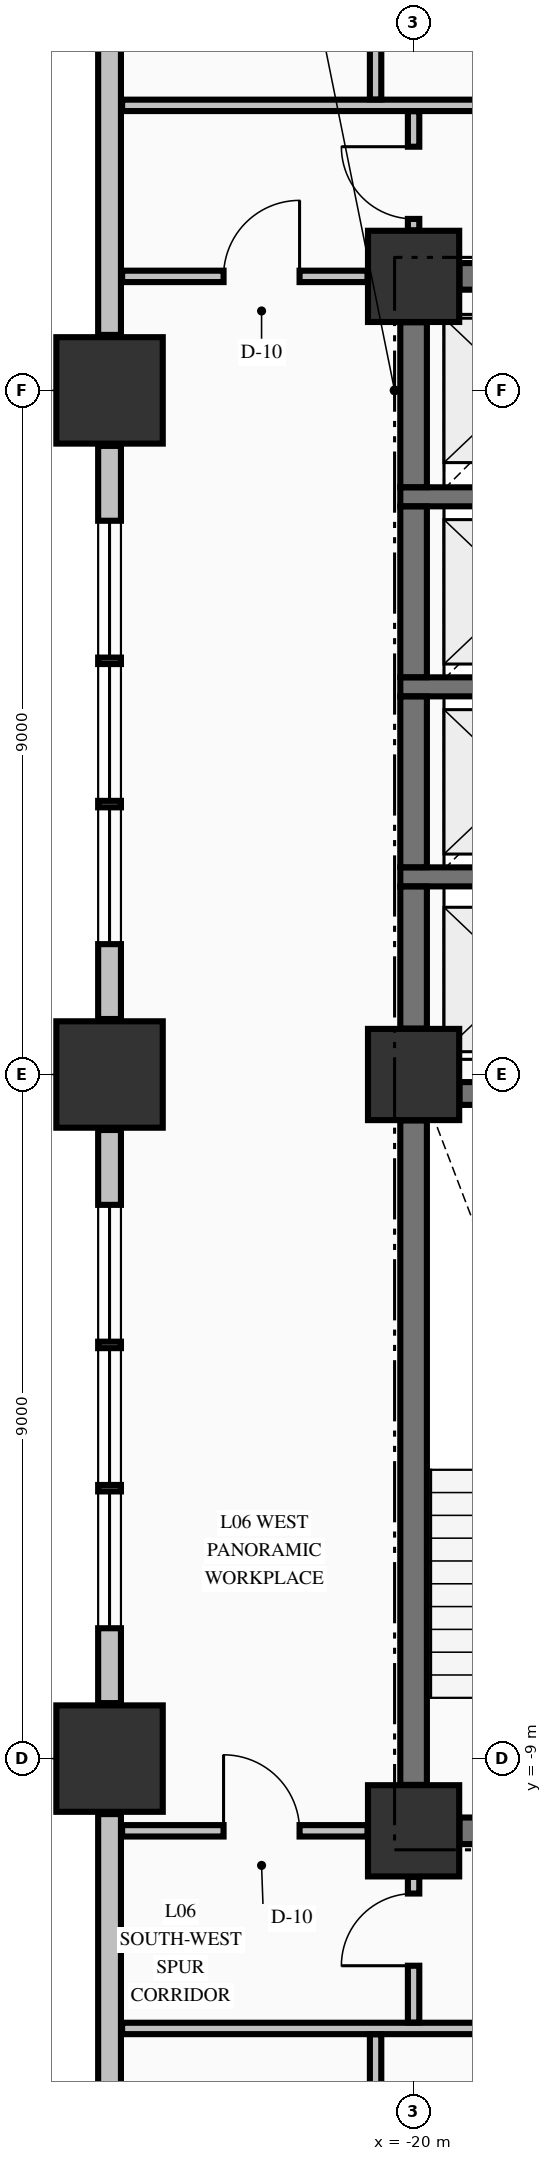
"""IFC4 building model, lengths in metres.
Left out: names, types, materials, properties, quantities, classifications, styles, units other than length and angle.
Written with IfcOpenShell. Run it as: python <this file> out.ifc"""

import sys

from ifc_helpers import new_model, si_unit, direction, frame, frame_2d, origin, origin_2d, place, context, subcontext, project, spatial, rectangle, extrude, element, fill, save


model = new_model("IFC4")
c1 = context("Model", 3, precision=1e-05, world=origin(), true_north=direction((0.0, 1.0)))
c2 = subcontext(c1, "Body", "Model", "MODEL_VIEW")
j1 = project(units=[si_unit("LENGTHUNIT", "METRE"), si_unit("PLANEANGLEUNIT", "RADIAN")], contexts=[c1])
p1 = place(None, origin())
s1 = spatial("IfcSite", under=j1, at=p1, CompositionType="ELEMENT")
p2 = place(p1, origin())
s2 = spatial("IfcBuilding", under=s1, at=p2, CompositionType="ELEMENT")
p3 = place(p2, frame((0.0, 0.0, 30.77)))
s3 = spatial("IfcBuildingStorey", under=s2, at=p3, CompositionType="ELEMENT", Elevation=30.77)
for number, where, z_axis, x_axis in (
    (1, (-24.0, -9.0, -0.25), (0.0, 0.0, 1.0), (1.0, 0.0, 0.0)),
    (2, (-24.0, 0.0, -0.25), (0.0, 0.0, 1.0), (1.0, 0.0, 0.0)),
    (3, (-24.0, 9.0, -0.25), (0.0, 0.0, 1.0), (1.0, 0.0, 0.0)),
):
    element("IfcColumn", number, at=place(p3, frame(where, z_axis=z_axis, x_axis=x_axis)), inside=s3, PredefinedType="COLUMN", context=c2, shape_type="SweptSolid", body=[
        extrude(rectangle(XDim=1.4, YDim=1.4, at=origin_2d()), origin(), (0.0, 0.0, 1.0), 3.52),
    ])
for number, where, z_axis, x_axis in (
    (4, (-20.0, -9.95, -0.25), (0.0, 0.0, 1.0), (1.0, 0.0, 0.0)),
    (5, (-20.0, 10.5, -0.25), (0.0, 0.0, 1.0), (1.0, 0.0, 0.0)),
    (6, (-20.0, 0.0, -0.25), (0.0, 0.0, 1.0), (1.0, 0.0, 0.0)),
):
    element("IfcColumn", number, at=place(p3, frame(where, z_axis=z_axis, x_axis=x_axis)), inside=s3, PredefinedType="COLUMN", context=c2, shape_type="SweptSolid", body=[
        extrude(rectangle(XDim=1.2, YDim=1.2, at=origin_2d()), origin(), (0.0, 0.0, 1.0), 3.52),
    ])
p4 = place(p3, frame((-24.0, -9.73, 0.0), z_axis=(0.0, 0.0, 1.0), x_axis=(0.0, -1.0, 0.0)))
e7 = element("IfcWall", 7, at=p4, inside=s3, PredefinedType="STANDARD", context=c2, shape_type="SweptSolid", body=[
    extrude(rectangle(XDim=12.54, YDim=0.3, at=frame_2d((6.27, 0.0))), origin(), (0.0, 0.0, 1.0), 2.662),
])
p5 = place(p3, frame((-24.0, -0.73, 0.0), z_axis=(0.0, 0.0, 1.0), x_axis=(0.0, -1.0, 0.0)))
e8 = element("IfcWall", 8, at=p5, inside=s3, PredefinedType="STANDARD", context=c2, shape_type="SweptSolid", body=[
    extrude(rectangle(XDim=7.54, YDim=0.3, at=frame_2d((3.77, 0.0))), origin(), (0.0, 0.0, 1.0), 2.662),
])
p6 = place(p5, frame((0.985, 0.0, 0.78)))
e9 = element("IfcOpeningElement", 9, at=p6, cuts=e8, PredefinedType="OPENING", context=c2, shape_type="SweptSolid", body=[
    extrude(rectangle(XDim=1.8, YDim=1.72, at=frame_2d((0.9, 0.86))), frame((0.0, 0.16, 0.0), z_axis=(0.0, -1.0, 0.0), x_axis=(1.0, 0.0, 0.0)), (0.0, 0.0, 1.0), 0.32),
])
p7 = place(p5, frame((2.87, 0.0, 0.78)))
e10 = element("IfcOpeningElement", 10, at=p7, cuts=e8, PredefinedType="OPENING", context=c2, shape_type="SweptSolid", body=[
    extrude(rectangle(XDim=1.8, YDim=1.72, at=frame_2d((0.9, 0.86))), frame((0.0, 0.16, 0.0), z_axis=(0.0, -1.0, 0.0), x_axis=(1.0, 0.0, 0.0)), (0.0, 0.0, 1.0), 0.32),
])
p8 = place(p5, frame((4.755, 0.0, 0.78)))
e11 = element("IfcOpeningElement", 11, at=p8, cuts=e8, PredefinedType="OPENING", context=c2, shape_type="SweptSolid", body=[
    extrude(rectangle(XDim=1.8, YDim=1.72, at=frame_2d((0.9, 0.86))), frame((0.0, 0.16, 0.0), z_axis=(0.0, -1.0, 0.0), x_axis=(1.0, 0.0, 0.0)), (0.0, 0.0, 1.0), 0.32),
])
p9 = place(p3, frame((-24.0, 8.27, 0.0), z_axis=(0.0, 0.0, 1.0), x_axis=(0.0, -1.0, 0.0)))
e12 = element("IfcWall", 12, at=p9, inside=s3, PredefinedType="STANDARD", context=c2, shape_type="SweptSolid", body=[
    extrude(rectangle(XDim=7.54, YDim=0.3, at=frame_2d((3.77, 0.0))), origin(), (0.0, 0.0, 1.0), 2.662),
])
p10 = place(p9, frame((0.985, 0.0, 0.78)))
e13 = element("IfcOpeningElement", 13, at=p10, cuts=e12, PredefinedType="OPENING", context=c2, shape_type="SweptSolid", body=[
    extrude(rectangle(XDim=1.8, YDim=1.72, at=frame_2d((0.9, 0.86))), frame((0.0, 0.16, 0.0), z_axis=(0.0, -1.0, 0.0), x_axis=(1.0, 0.0, 0.0)), (0.0, 0.0, 1.0), 0.32),
])
p11 = place(p9, frame((2.87, 0.0, 0.78)))
e14 = element("IfcOpeningElement", 14, at=p11, cuts=e12, PredefinedType="OPENING", context=c2, shape_type="SweptSolid", body=[
    extrude(rectangle(XDim=1.8, YDim=1.72, at=frame_2d((0.9, 0.86))), frame((0.0, 0.16, 0.0), z_axis=(0.0, -1.0, 0.0), x_axis=(1.0, 0.0, 0.0)), (0.0, 0.0, 1.0), 0.32),
])
p12 = place(p9, frame((4.755, 0.0, 0.78)))
e15 = element("IfcOpeningElement", 15, at=p12, cuts=e12, PredefinedType="OPENING", context=c2, shape_type="SweptSolid", body=[
    extrude(rectangle(XDim=1.8, YDim=1.72, at=frame_2d((0.9, 0.86))), frame((0.0, 0.16, 0.0), z_axis=(0.0, -1.0, 0.0), x_axis=(1.0, 0.0, 0.0)), (0.0, 0.0, 1.0), 0.32),
])
p13 = place(p3, frame((-24.0, 22.27, 0.0), z_axis=(0.0, 0.0, 1.0), x_axis=(0.0, -1.0, 0.0)))
e16 = element("IfcWall", 16, at=p13, inside=s3, PredefinedType="STANDARD", context=c2, shape_type="SweptSolid", body=[
    extrude(rectangle(XDim=12.54, YDim=0.3, at=frame_2d((6.27, 0.0))), origin(), (0.0, 0.0, 1.0), 2.662),
])
p14 = place(p3, frame((-19.396, -9.95, 0.0), z_axis=(0.0, 0.0, 1.0), x_axis=(1.0, 0.0, 0.0)))
e17 = element("IfcWall", 17, at=p14, inside=s3, PredefinedType="SHEAR", context=c2, shape_type="SweptSolid", body=[
    extrude(rectangle(XDim=4.696, YDim=0.35, at=frame_2d((2.348, 0.0))), origin(), (0.0, 0.0, 1.0), 3.27),
])
p15 = place(p14, frame((0.571, 0.0, 0.0)))
e18 = element("IfcOpeningElement", 18, at=p15, cuts=e17, PredefinedType="OPENING", context=c2, shape_type="SweptSolid", body=[
    extrude(rectangle(XDim=1.05, YDim=2.15, at=frame_2d((0.525, 1.075))), frame((0.0, 0.185, 0.0), z_axis=(0.0, -1.0, 0.0), x_axis=(1.0, 0.0, 0.0)), (0.0, 0.0, 1.0), 0.37),
])
p16 = place(p3, frame((-19.396, -0.25, 0.0), z_axis=(0.0, 0.0, 1.0), x_axis=(1.0, 0.0, 0.0)))
e19 = element("IfcWall", 19, at=p16, inside=s3, PredefinedType="SHEAR", context=c2, shape_type="SweptSolid", body=[
    extrude(rectangle(XDim=7.792, YDim=0.3, at=frame_2d((3.896, 0.0))), origin(), (0.0, 0.0, 1.0), 3.27),
])
p17 = place(p16, frame((5.696, 0.0, 0.0)))
e20 = element("IfcOpeningElement", 20, at=p17, cuts=e19, PredefinedType="OPENING", context=c2, shape_type="SweptSolid", body=[
    extrude(rectangle(XDim=1.1, YDim=2.15, at=frame_2d((0.55, 1.075))), frame((0.0, 0.16, 0.0), z_axis=(0.0, -1.0, 0.0), x_axis=(1.0, 0.0, 0.0)), (0.0, 0.0, 1.0), 0.32),
])
for number, where, z_axis, x_axis in (
    (21, (-20.175, 2.6, 0.0), (0.0, 0.0, 1.0), (1.0, 0.0, 0.0)),
    (22, (-20.175, 5.1, 0.0), (0.0, 0.0, 1.0), (1.0, 0.0, 0.0)),
    (23, (-20.175, 7.6, 0.0), (0.0, 0.0, 1.0), (1.0, 0.0, 0.0)),
):
    element("IfcWall", number, at=place(p3, frame(where, z_axis=z_axis, x_axis=x_axis)), inside=s3, PredefinedType="SOLIDWALL", context=c2, shape_type="SweptSolid", body=[
        extrude(rectangle(XDim=3.1, YDim=0.25, at=frame_2d((1.55, 0.0))), origin(), (0.0, 0.0, 1.0), 3.27),
    ])
p18 = place(p3, frame((-19.396, 10.5, 0.0), z_axis=(0.0, 0.0, 1.0), x_axis=(1.0, 0.0, 0.0)))
e24 = element("IfcWall", 24, at=p18, inside=s3, PredefinedType="SHEAR", context=c2, shape_type="SweptSolid", body=[
    extrude(rectangle(XDim=4.696, YDim=0.35, at=frame_2d((2.348, 0.0))), origin(), (0.0, 0.0, 1.0), 3.27),
])
p19 = place(p18, frame((2.796, 0.0, 0.0)))
e25 = element("IfcOpeningElement", 25, at=p19, cuts=e24, PredefinedType="OPENING", context=c2, shape_type="SweptSolid", body=[
    extrude(rectangle(XDim=1.2, YDim=2.15, at=frame_2d((0.6, 1.075))), frame((0.0, 0.185, 0.0), z_axis=(0.0, -1.0, 0.0), x_axis=(1.0, 0.0, 0.0)), (0.0, 0.0, 1.0), 0.37),
])
p20 = place(p3, frame((-23.835, -12.55, 0.0), z_axis=(0.0, 0.0, 1.0), x_axis=(1.0, 0.0, 0.0)))
e26 = element("IfcWall", 26, at=p20, inside=s3, PredefinedType="PARTITIONING", context=c2, shape_type="SweptSolid", body=[
    extrude(rectangle(XDim=52.67, YDim=0.15, at=frame_2d((26.335, 0.0))), origin(), (0.0, 0.0, 1.0), 3.27),
])
p21 = place(p20, frame((5.51, 0.0, 0.0)))
e27 = element("IfcOpeningElement", 27, at=p21, cuts=e26, PredefinedType="OPENING", context=c2, shape_type="SweptSolid", body=[
    extrude(rectangle(XDim=0.95, YDim=2.15, at=frame_2d((0.475, 1.075))), frame((0.0, 0.085, 0.0), z_axis=(0.0, -1.0, 0.0), x_axis=(1.0, 0.0, 0.0)), (0.0, 0.0, 1.0), 0.17),
])
p22 = place(p20, frame((12.81, 0.0, 0.0)))
e28 = element("IfcOpeningElement", 28, at=p22, cuts=e26, PredefinedType="OPENING", context=c2, shape_type="SweptSolid", body=[
    extrude(rectangle(XDim=0.95, YDim=2.15, at=frame_2d((0.475, 1.075))), frame((0.0, 0.085, 0.0), z_axis=(0.0, -1.0, 0.0), x_axis=(1.0, 0.0, 0.0)), (0.0, 0.0, 1.0), 0.17),
])
p23 = place(p20, frame((19.01, 0.0, 0.0)))
e29 = element("IfcOpeningElement", 29, at=p23, cuts=e26, PredefinedType="OPENING", context=c2, shape_type="SweptSolid", body=[
    extrude(rectangle(XDim=1.05, YDim=2.15, at=frame_2d((0.525, 1.075))), frame((0.0, 0.085, 0.0), z_axis=(0.0, -1.0, 0.0), x_axis=(1.0, 0.0, 0.0)), (0.0, 0.0, 1.0), 0.17),
])
p24 = place(p20, frame((27.06, 0.0, 0.0)))
e30 = element("IfcOpeningElement", 30, at=p24, cuts=e26, PredefinedType="OPENING", context=c2, shape_type="SweptSolid", body=[
    extrude(rectangle(XDim=0.95, YDim=2.15, at=frame_2d((0.475, 1.075))), frame((0.0, 0.085, 0.0), z_axis=(0.0, -1.0, 0.0), x_axis=(1.0, 0.0, 0.0)), (0.0, 0.0, 1.0), 0.17),
])
p25 = place(p20, frame((34.81, 0.0, 0.0)))
e31 = element("IfcOpeningElement", 31, at=p25, cuts=e26, PredefinedType="OPENING", context=c2, shape_type="SweptSolid", body=[
    extrude(rectangle(XDim=0.95, YDim=2.15, at=frame_2d((0.475, 1.075))), frame((0.0, 0.085, 0.0), z_axis=(0.0, -1.0, 0.0), x_axis=(1.0, 0.0, 0.0)), (0.0, 0.0, 1.0), 0.17),
])
p26 = place(p20, frame((39.76, 0.0, 0.0)))
e32 = element("IfcOpeningElement", 32, at=p26, cuts=e26, PredefinedType="OPENING", context=c2, shape_type="SweptSolid", body=[
    extrude(rectangle(XDim=1.05, YDim=2.15, at=frame_2d((0.525, 1.075))), frame((0.0, 0.085, 0.0), z_axis=(0.0, -1.0, 0.0), x_axis=(1.0, 0.0, 0.0)), (0.0, 0.0, 1.0), 0.17),
])
p27 = place(p3, frame((-23.835, -9.95, 0.0), z_axis=(0.0, 0.0, 1.0), x_axis=(1.0, 0.0, 0.0)))
e33 = element("IfcWall", 33, at=p27, inside=s3, PredefinedType="PARTITIONING", context=c2, shape_type="SweptSolid", body=[
    extrude(rectangle(XDim=3.229, YDim=0.15, at=frame_2d((1.615, 0.0))), origin(), (0.0, 0.0, 1.0), 3.27),
])
p28 = place(p27, frame((1.335, 0.0, 0.0)))
e34 = element("IfcOpeningElement", 34, at=p28, cuts=e33, PredefinedType="OPENING", context=c2, shape_type="SweptSolid", body=[
    extrude(rectangle(XDim=1.0, YDim=2.15, at=frame_2d((0.5, 1.075))), frame((0.0, 0.085, 0.0), z_axis=(0.0, -1.0, 0.0), x_axis=(1.0, 0.0, 0.0)), (0.0, 0.0, 1.0), 0.17),
])
p29 = place(p3, frame((-23.835, 10.5, 0.0), z_axis=(0.0, 0.0, 1.0), x_axis=(1.0, 0.0, 0.0)))
e35 = element("IfcWall", 35, at=p29, inside=s3, PredefinedType="PARTITIONING", context=c2, shape_type="SweptSolid", body=[
    extrude(rectangle(XDim=3.229, YDim=0.15, at=frame_2d((1.615, 0.0))), origin(), (0.0, 0.0, 1.0), 3.27),
])
p30 = place(p29, frame((1.335, 0.0, 0.0)))
e36 = element("IfcOpeningElement", 36, at=p30, cuts=e35, PredefinedType="OPENING", context=c2, shape_type="SweptSolid", body=[
    extrude(rectangle(XDim=1.0, YDim=2.15, at=frame_2d((0.5, 1.075))), frame((0.0, 0.085, 0.0), z_axis=(0.0, -1.0, 0.0), x_axis=(1.0, 0.0, 0.0)), (0.0, 0.0, 1.0), 0.17),
])
p31 = place(p3, frame((-23.835, 12.75, 0.0), z_axis=(0.0, 0.0, 1.0), x_axis=(1.0, 0.0, 0.0)))
e37 = element("IfcWall", 37, at=p31, inside=s3, PredefinedType="PARTITIONING", context=c2, shape_type="SweptSolid", body=[
    extrude(rectangle(XDim=52.67, YDim=0.15, at=frame_2d((26.335, 0.0))), origin(), (0.0, 0.0, 1.0), 3.27),
])
p32 = place(p31, frame((5.71, 0.0, 0.0)))
e38 = element("IfcOpeningElement", 38, at=p32, cuts=e37, PredefinedType="OPENING", context=c2, shape_type="SweptSolid", body=[
    extrude(rectangle(XDim=0.95, YDim=2.15, at=frame_2d((0.475, 1.075))), frame((0.0, 0.085, 0.0), z_axis=(0.0, -1.0, 0.0), x_axis=(1.0, 0.0, 0.0)), (0.0, 0.0, 1.0), 0.17),
])
p33 = place(p31, frame((13.21, 0.0, 0.0)))
e39 = element("IfcOpeningElement", 39, at=p33, cuts=e37, PredefinedType="OPENING", context=c2, shape_type="SweptSolid", body=[
    extrude(rectangle(XDim=0.95, YDim=2.15, at=frame_2d((0.475, 1.075))), frame((0.0, 0.085, 0.0), z_axis=(0.0, -1.0, 0.0), x_axis=(1.0, 0.0, 0.0)), (0.0, 0.0, 1.0), 0.17),
])
p34 = place(p31, frame((17.56, 0.0, 0.0)))
e40 = element("IfcOpeningElement", 40, at=p34, cuts=e37, PredefinedType="OPENING", context=c2, shape_type="SweptSolid", body=[
    extrude(rectangle(XDim=0.95, YDim=2.15, at=frame_2d((0.475, 1.075))), frame((0.0, 0.085, 0.0), z_axis=(0.0, -1.0, 0.0), x_axis=(1.0, 0.0, 0.0)), (0.0, 0.0, 1.0), 0.17),
])
p35 = place(p31, frame((21.91, 0.0, 0.0)))
e41 = element("IfcOpeningElement", 41, at=p35, cuts=e37, PredefinedType="OPENING", context=c2, shape_type="SweptSolid", body=[
    extrude(rectangle(XDim=0.95, YDim=2.15, at=frame_2d((0.475, 1.075))), frame((0.0, 0.085, 0.0), z_axis=(0.0, -1.0, 0.0), x_axis=(1.0, 0.0, 0.0)), (0.0, 0.0, 1.0), 0.17),
])
p36 = place(p31, frame((31.21, 0.0, 0.0)))
e42 = element("IfcOpeningElement", 42, at=p36, cuts=e37, PredefinedType="OPENING", context=c2, shape_type="SweptSolid", body=[
    extrude(rectangle(XDim=1.05, YDim=2.15, at=frame_2d((0.525, 1.075))), frame((0.0, 0.085, 0.0), z_axis=(0.0, -1.0, 0.0), x_axis=(1.0, 0.0, 0.0)), (0.0, 0.0, 1.0), 0.17),
])
p37 = place(p31, frame((39.46, 0.0, 0.0)))
e43 = element("IfcOpeningElement", 43, at=p37, cuts=e37, PredefinedType="OPENING", context=c2, shape_type="SweptSolid", body=[
    extrude(rectangle(XDim=1.05, YDim=2.15, at=frame_2d((0.525, 1.075))), frame((0.0, 0.085, 0.0), z_axis=(0.0, -1.0, 0.0), x_axis=(1.0, 0.0, 0.0)), (0.0, 0.0, 1.0), 0.17),
])
p38 = place(p3, frame((-20.0, -9.346, 0.0), z_axis=(0.0, 0.0, 1.0), x_axis=(0.0, 1.0, 0.0)))
e44 = element("IfcWall", 44, at=p38, inside=s3, PredefinedType="SHEAR", context=c2, shape_type="SweptSolid", body=[
    extrude(rectangle(XDim=8.742, YDim=0.35, at=frame_2d((4.371, 0.0))), origin(), (0.0, 0.0, 1.0), 3.27),
])
p39 = place(p3, frame((-20.0, 0.604, 0.0), z_axis=(0.0, 0.0, 1.0), x_axis=(0.0, 1.0, 0.0)))
e45 = element("IfcWall", 45, at=p39, inside=s3, PredefinedType="SHEAR", context=c2, shape_type="SweptSolid", body=[
    extrude(rectangle(XDim=1.869, YDim=0.35, at=frame_2d((0.935, 0.0))), origin(), (0.0, 0.0, 1.0), 3.27),
])
for number, where, z_axis, x_axis in (
    (46, (-20.0, 2.727, 0.0), (0.0, 0.0, 1.0), (0.0, 1.0, 0.0)),
    (47, (-20.0, 5.227, 0.0), (0.0, 0.0, 1.0), (0.0, 1.0, 0.0)),
):
    element("IfcWall", number, at=place(p3, frame(where, z_axis=z_axis, x_axis=x_axis)), inside=s3, PredefinedType="SHEAR", context=c2, shape_type="SweptSolid", body=[
        extrude(rectangle(XDim=2.246, YDim=0.35, at=frame_2d((1.123, 0.0))), origin(), (0.0, 0.0, 1.0), 3.27),
    ])
p40 = place(p3, frame((-20.0, 7.727, 0.0), z_axis=(0.0, 0.0, 1.0), x_axis=(0.0, 1.0, 0.0)))
e48 = element("IfcWall", 48, at=p40, inside=s3, PredefinedType="SHEAR", context=c2, shape_type="SweptSolid", body=[
    extrude(rectangle(XDim=2.169, YDim=0.35, at=frame_2d((1.084, 0.0))), origin(), (0.0, 0.0, 1.0), 3.27),
])
p41 = place(p3, frame((-20.5, -22.294, 0.0), z_axis=(0.0, 0.0, 1.0), x_axis=(0.0, 1.0, 0.0)))
e49 = element("IfcWall", 49, at=p41, inside=s3, PredefinedType="PARTITIONING", context=c2, shape_type="SweptSolid", body=[
    extrude(rectangle(XDim=9.666, YDim=0.15, at=frame_2d((4.833, 0.0))), origin(), (0.0, 0.0, 1.0), 3.27),
])
p42 = place(p3, frame((-20.5, 12.828, 0.0), z_axis=(0.0, 0.0, 1.0), x_axis=(0.0, 1.0, 0.0)))
e50 = element("IfcWall", 50, at=p42, inside=s3, PredefinedType="PARTITIONING", context=c2, shape_type="SweptSolid", body=[
    extrude(rectangle(XDim=9.466, YDim=0.15, at=frame_2d((4.733, 0.0))), origin(), (0.0, 0.0, 1.0), 3.27),
])
p43 = place(p3, frame((-20.0, -12.472, 0.0), z_axis=(0.0, 0.0, 1.0), x_axis=(0.0, 1.0, 0.0)))
e51 = element("IfcWall", 51, at=p43, inside=s3, PredefinedType="PARTITIONING", context=c2, shape_type="SweptSolid", body=[
    extrude(rectangle(XDim=1.916, YDim=0.15, at=frame_2d((0.958, 0.0))), origin(), (0.0, 0.0, 1.0), 3.27),
])
p44 = place(p43, frame((0.747, 0.0, 0.0)))
e52 = element("IfcOpeningElement", 52, at=p44, cuts=e51, PredefinedType="OPENING", context=c2, shape_type="SweptSolid", body=[
    extrude(rectangle(XDim=0.95, YDim=2.15, at=frame_2d((0.475, 1.075))), frame((0.0, 0.085, 0.0), z_axis=(0.0, -1.0, 0.0), x_axis=(1.0, 0.0, 0.0)), (0.0, 0.0, 1.0), 0.17),
])
p45 = place(p3, frame((-20.0, 11.106, 0.0), z_axis=(0.0, 0.0, 1.0), x_axis=(0.0, 1.0, 0.0)))
e53 = element("IfcWall", 53, at=p45, inside=s3, PredefinedType="PARTITIONING", context=c2, shape_type="SweptSolid", body=[
    extrude(rectangle(XDim=1.566, YDim=0.15, at=frame_2d((0.783, 0.0))), origin(), (0.0, 0.0, 1.0), 3.27),
])
p46 = place(p45, frame((0.15, 0.0, 0.0)))
e54 = element("IfcOpeningElement", 54, at=p46, cuts=e53, PredefinedType="OPENING", context=c2, shape_type="SweptSolid", body=[
    extrude(rectangle(XDim=0.95, YDim=2.15, at=frame_2d((0.475, 1.075))), frame((0.0, 0.085, 0.0), z_axis=(0.0, -1.0, 0.0), x_axis=(1.0, 0.0, 0.0)), (0.0, 0.0, 1.0), 0.17),
])
p47 = place(p6, origin())
e55 = element("IfcWindow", 55, at=p47, inside=s3, PartitioningType="SINGLE_PANEL", PredefinedType="WINDOW", context=c2, shape_type="SweptSolid", body=[
    extrude(rectangle(XDim=1.8, YDim=1.72, at=frame_2d((0.9, 0.86))), frame((0.0, 0.03, 0.0), z_axis=(0.0, -1.0, 0.0), x_axis=(1.0, 0.0, 0.0)), (0.0, 0.0, 1.0), 0.06),
])
fill(e9, e55)
p48 = place(p7, origin())
e56 = element("IfcWindow", 56, at=p48, inside=s3, PartitioningType="SINGLE_PANEL", PredefinedType="WINDOW", context=c2, shape_type="SweptSolid", body=[
    extrude(rectangle(XDim=1.8, YDim=1.72, at=frame_2d((0.9, 0.86))), frame((0.0, 0.03, 0.0), z_axis=(0.0, -1.0, 0.0), x_axis=(1.0, 0.0, 0.0)), (0.0, 0.0, 1.0), 0.06),
])
fill(e10, e56)
p49 = place(p8, origin())
e57 = element("IfcWindow", 57, at=p49, inside=s3, PartitioningType="SINGLE_PANEL", PredefinedType="WINDOW", context=c2, shape_type="SweptSolid", body=[
    extrude(rectangle(XDim=1.8, YDim=1.72, at=frame_2d((0.9, 0.86))), frame((0.0, 0.03, 0.0), z_axis=(0.0, -1.0, 0.0), x_axis=(1.0, 0.0, 0.0)), (0.0, 0.0, 1.0), 0.06),
])
fill(e11, e57)
p50 = place(p10, origin())
e58 = element("IfcWindow", 58, at=p50, inside=s3, PartitioningType="SINGLE_PANEL", PredefinedType="WINDOW", context=c2, shape_type="SweptSolid", body=[
    extrude(rectangle(XDim=1.8, YDim=1.72, at=frame_2d((0.9, 0.86))), frame((0.0, 0.03, 0.0), z_axis=(0.0, -1.0, 0.0), x_axis=(1.0, 0.0, 0.0)), (0.0, 0.0, 1.0), 0.06),
])
fill(e13, e58)
p51 = place(p11, origin())
e59 = element("IfcWindow", 59, at=p51, inside=s3, PartitioningType="SINGLE_PANEL", PredefinedType="WINDOW", context=c2, shape_type="SweptSolid", body=[
    extrude(rectangle(XDim=1.8, YDim=1.72, at=frame_2d((0.9, 0.86))), frame((0.0, 0.03, 0.0), z_axis=(0.0, -1.0, 0.0), x_axis=(1.0, 0.0, 0.0)), (0.0, 0.0, 1.0), 0.06),
])
fill(e14, e59)
p52 = place(p12, origin())
e60 = element("IfcWindow", 60, at=p52, inside=s3, PartitioningType="SINGLE_PANEL", PredefinedType="WINDOW", context=c2, shape_type="SweptSolid", body=[
    extrude(rectangle(XDim=1.8, YDim=1.72, at=frame_2d((0.9, 0.86))), frame((0.0, 0.03, 0.0), z_axis=(0.0, -1.0, 0.0), x_axis=(1.0, 0.0, 0.0)), (0.0, 0.0, 1.0), 0.06),
])
fill(e15, e60)
p53 = place(p46, origin())
e61 = element("IfcDoor", 61, at=p53, inside=s3, OperationType="SINGLE_SWING_RIGHT", PredefinedType="DOOR", context=c2, shape_type="SweptSolid", body=[
    extrude(rectangle(XDim=0.95, YDim=2.15, at=frame_2d((0.475, 1.075))), frame((0.0, 0.025, 0.0), z_axis=(0.0, -1.0, 0.0), x_axis=(1.0, 0.0, 0.0)), (0.0, 0.0, 1.0), 0.05),
])
fill(e54, e61)
p54 = place(p44, origin())
e62 = element("IfcDoor", 62, at=p54, inside=s3, OperationType="SINGLE_SWING_LEFT", PredefinedType="DOOR", context=c2, shape_type="SweptSolid", body=[
    extrude(rectangle(XDim=0.95, YDim=2.15, at=frame_2d((0.475, 1.075))), frame((0.0, 0.025, 0.0), z_axis=(0.0, -1.0, 0.0), x_axis=(1.0, 0.0, 0.0)), (0.0, 0.0, 1.0), 0.05),
])
fill(e52, e62)
p55 = place(p30, origin())
e63 = element("IfcDoor", 63, at=p55, inside=s3, OperationType="SINGLE_SWING_RIGHT", PredefinedType="DOOR", context=c2, shape_type="SweptSolid", body=[
    extrude(rectangle(XDim=1.0, YDim=2.15, at=frame_2d((0.5, 1.075))), frame((0.0, 0.025, 0.0), z_axis=(0.0, -1.0, 0.0), x_axis=(1.0, 0.0, 0.0)), (0.0, 0.0, 1.0), 0.05),
])
fill(e36, e63)
p56 = place(p28, origin())
e64 = element("IfcDoor", 64, at=p56, inside=s3, OperationType="SINGLE_SWING_LEFT", PredefinedType="DOOR", context=c2, shape_type="SweptSolid", body=[
    extrude(rectangle(XDim=1.0, YDim=2.15, at=frame_2d((0.5, 1.075))), frame((0.0, 0.025, 0.0), z_axis=(0.0, -1.0, 0.0), x_axis=(1.0, 0.0, 0.0)), (0.0, 0.0, 1.0), 0.05),
])
fill(e34, e64)
save(model, sys.argv[1])
